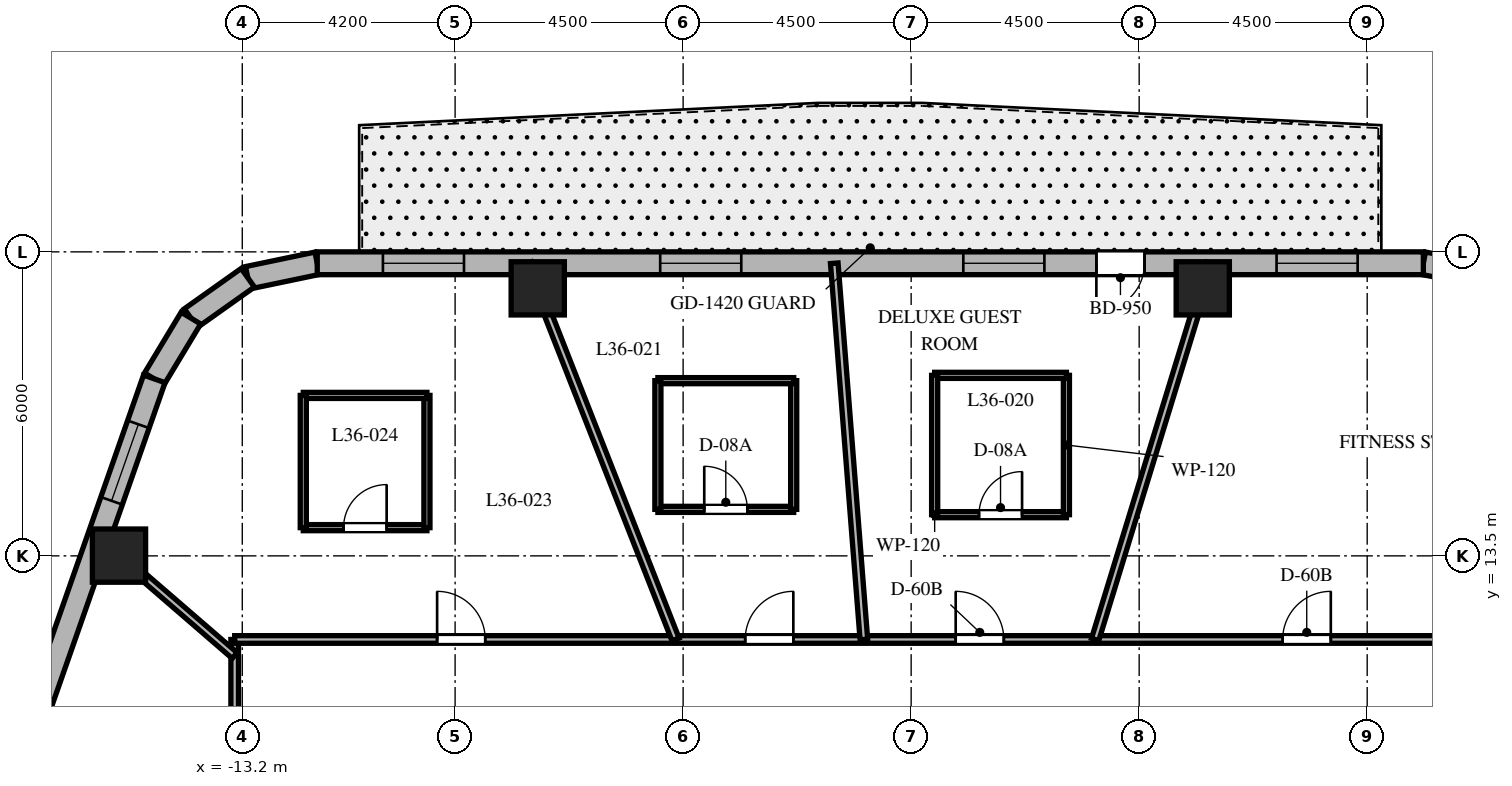
"""IFC4 building model, lengths in metres.
Left out: names, types, materials, properties, quantities, classifications, styles, units other than length and angle.
Written with IfcOpenShell. Run it as: python <this file> out.ifc"""

import sys

from ifc_helpers import new_model, si_unit, direction, frame, frame_2d, origin, origin_2d, place, context, subcontext, project, spatial, rectangle, extrude, element, fill, save


model = new_model("IFC4")
c1 = context("Model", 3, precision=1e-05, world=origin(), true_north=direction((0.0, 1.0)))
c2 = subcontext(c1, "Body", "Model", "MODEL_VIEW")
j1 = project(units=[si_unit("LENGTHUNIT", "METRE"), si_unit("PLANEANGLEUNIT", "RADIAN")], contexts=[c1])
p1 = place(None, origin())
s1 = spatial("IfcSite", under=j1, at=p1, CompositionType="ELEMENT")
p2 = place(p1, origin())
s2 = spatial("IfcBuilding", under=s1, at=p2, CompositionType="ELEMENT")
p3 = place(p2, frame((0.0, 0.0, 148.0)))
s3 = spatial("IfcBuildingStorey", under=s2, at=p3, CompositionType="ELEMENT", Elevation=148.0)
for number, where, z_axis, x_axis in (
    (1, (5.755, 18.78, 0.0), (0.0, 0.0, 1.0), (1.0, 0.0, 0.0)),
    (2, (-7.369, 18.78, 0.0), (0.0, 0.0, 1.0), (1.0, 0.0, 0.0)),
    (3, (-15.633, 13.505, 0.0), (0.0, 0.0, 1.0), (1.0, 0.0, 0.0)),
):
    element("IfcColumn", number, at=place(p3, frame(where, z_axis=z_axis, x_axis=x_axis)), inside=s3, PredefinedType="COLUMN", context=c2, shape_type="SweptSolid", body=[
        extrude(rectangle(XDim=1.05, YDim=1.05, at=origin_2d()), origin(), (0.0, 0.0, 1.0), 3.7),
    ])
p4 = place(p3, frame((11.349, 19.043, 0.0), z_axis=(0.0, 0.0, 1.0), x_axis=(-0.982931267051, 0.183973161772, 0.0)))
e4 = element("IfcWall", 4, at=p4, inside=s3, PredefinedType="SOLIDWALL", context=c2, shape_type="SweptSolid", body=[
    extrude(rectangle(XDim=1.262, YDim=0.45, at=frame_2d((0.631, 0.0))), origin(), (0.0, 0.0, 1.0), 3.4),
])
p5 = place(p3, frame((-11.72, 19.275, 0.0), z_axis=(0.0, 0.0, 1.0), x_axis=(-0.97893106758, -0.204191001093, 0.0)))
e5 = element("IfcWall", 5, at=p5, inside=s3, PredefinedType="SOLIDWALL", context=c2, shape_type="SweptSolid", body=[
    extrude(rectangle(XDim=1.4, YDim=0.45, at=frame_2d((0.7, 0.0))), origin(), (0.0, 0.0, 1.0), 3.4),
])
p6 = place(p3, frame((-13.091, 18.989, 0.0), z_axis=(0.0, 0.0, 1.0), x_axis=(-0.815574637848, -0.578651890258, 0.0)))
e6 = element("IfcWall", 6, at=p6, inside=s3, PredefinedType="SOLIDWALL", context=c2, shape_type="SweptSolid", body=[
    extrude(rectangle(XDim=1.377, YDim=0.45, at=frame_2d((0.688, 0.0))), origin(), (0.0, 0.0, 1.0), 3.4),
])
p7 = place(p3, frame((-14.214, 18.192, 0.0), z_axis=(0.0, 0.0, 1.0), x_axis=(-0.516340945502, -0.856383108193, 0.0)))
e7 = element("IfcWall", 7, at=p7, inside=s3, PredefinedType="SOLIDWALL", context=c2, shape_type="SweptSolid", body=[
    extrude(rectangle(XDim=1.4, YDim=0.45, at=frame_2d((0.7, 0.0))), origin(), (0.0, 0.0, 1.0), 3.4),
])
p8 = place(p3, frame((10.108, 19.275, 0.0), z_axis=(0.0, 0.0, 1.0), x_axis=(-1.0, 0.0, 0.0)))
e8 = element("IfcWall", 8, at=p8, inside=s3, PredefinedType="SOLIDWALL", context=c2, shape_type="SweptSolid", body=[
    extrude(rectangle(XDim=21.829, YDim=0.45, at=frame_2d((10.915, 0.0))), origin(), (0.0, 0.0, 1.0), 3.4),
])
p9 = place(p8, frame((5.503, 0.0, 0.0)))
e9 = element("IfcOpeningElement", 9, at=p9, cuts=e8, PredefinedType="OPENING", context=c2, shape_type="SweptSolid", body=[
    extrude(rectangle(XDim=0.95, YDim=2.15, at=frame_2d((0.475, 1.075))), frame((0.0, 0.235, 0.0), z_axis=(0.0, -1.0, 0.0), x_axis=(1.0, 0.0, 0.0)), (0.0, 0.0, 1.0), 0.47),
])
p10 = place(p8, frame((1.297, 0.0, 0.8)))
e10 = element("IfcOpeningElement", 10, at=p10, cuts=e8, PredefinedType="OPENING", context=c2, shape_type="SweptSolid", body=[
    extrude(rectangle(XDim=1.6, YDim=1.75, at=frame_2d((0.8, 0.875))), frame((0.0, 0.235, 0.0), z_axis=(0.0, -1.0, 0.0), x_axis=(1.0, 0.0, 0.0)), (0.0, 0.0, 1.0), 0.47),
])
p11 = place(p8, frame((7.479, 0.0, 0.8)))
e11 = element("IfcOpeningElement", 11, at=p11, cuts=e8, PredefinedType="OPENING", context=c2, shape_type="SweptSolid", body=[
    extrude(rectangle(XDim=1.6, YDim=1.75, at=frame_2d((0.8, 0.875))), frame((0.0, 0.235, 0.0), z_axis=(0.0, -1.0, 0.0), x_axis=(1.0, 0.0, 0.0)), (0.0, 0.0, 1.0), 0.47),
])
p12 = place(p8, frame((13.461, 0.0, 0.8)))
e12 = element("IfcOpeningElement", 12, at=p12, cuts=e8, PredefinedType="OPENING", context=c2, shape_type="SweptSolid", body=[
    extrude(rectangle(XDim=1.6, YDim=1.75, at=frame_2d((0.8, 0.875))), frame((0.0, 0.235, 0.0), z_axis=(0.0, -1.0, 0.0), x_axis=(1.0, 0.0, 0.0)), (0.0, 0.0, 1.0), 0.47),
])
p13 = place(p8, frame((18.933, 0.0, 0.8)))
e13 = element("IfcOpeningElement", 13, at=p13, cuts=e8, PredefinedType="OPENING", context=c2, shape_type="SweptSolid", body=[
    extrude(rectangle(XDim=1.6, YDim=1.75, at=frame_2d((0.8, 0.875))), frame((0.0, 0.235, 0.0), z_axis=(0.0, -1.0, 0.0), x_axis=(1.0, 0.0, 0.0)), (0.0, 0.0, 1.0), 0.47),
])
p14 = place(p3, frame((-14.937, 16.993, 0.0), z_axis=(0.0, 0.0, 1.0), x_axis=(-0.330431575061, -0.943829949834, 0.0)))
e14 = element("IfcWall", 14, at=p14, inside=s3, PredefinedType="SOLIDWALL", context=c2, shape_type="SweptSolid", body=[
    extrude(rectangle(XDim=17.689, YDim=0.45, at=frame_2d((8.844, 0.0))), origin(), (0.0, 0.0, 1.0), 3.4),
])
p15 = place(p14, frame((0.95, 0.0, 0.8)))
e15 = element("IfcOpeningElement", 15, at=p15, cuts=e14, PredefinedType="OPENING", context=c2, shape_type="SweptSolid", body=[
    extrude(rectangle(XDim=1.6, YDim=1.75, at=frame_2d((0.8, 0.875))), frame((0.0, 0.235, 0.0), z_axis=(0.0, -1.0, 0.0), x_axis=(1.0, 0.0, 0.0)), (0.0, 0.0, 1.0), 0.47),
])
p16 = place(p14, frame((7.99, 0.0, 0.8)))
e16 = element("IfcOpeningElement", 16, at=p16, cuts=e14, PredefinedType="OPENING", context=c2, shape_type="SweptSolid", body=[
    extrude(rectangle(XDim=1.6, YDim=1.75, at=frame_2d((0.8, 0.875))), frame((0.0, 0.235, 0.0), z_axis=(0.0, -1.0, 0.0), x_axis=(1.0, 0.0, 0.0)), (0.0, 0.0, 1.0), 0.47),
])
p17 = place(p14, frame((15.084, 0.0, 0.8)))
e17 = element("IfcOpeningElement", 17, at=p17, cuts=e14, PredefinedType="OPENING", context=c2, shape_type="SweptSolid", body=[
    extrude(rectangle(XDim=1.6, YDim=1.75, at=frame_2d((0.8, 0.875))), frame((0.0, 0.235, 0.0), z_axis=(0.0, -1.0, 0.0), x_axis=(1.0, 0.0, 0.0)), (0.0, 0.0, 1.0), 0.47),
])
p18 = place(p3, frame((-13.35, -11.85, 0.0), z_axis=(0.0, 0.0, 1.0), x_axis=(0.0, 1.0, 0.0)))
e18 = element("IfcWall", 18, at=p18, inside=s3, PredefinedType="PARTITIONING", context=c2, shape_type="SweptSolid", body=[
    extrude(rectangle(XDim=23.7, YDim=0.15, at=frame_2d((11.85, 0.0))), origin(), (0.0, 0.0, 1.0), 2.84),
])
p19 = place(p18, frame((18.389, 0.0, 0.0)))
e19 = element("IfcOpeningElement", 19, at=p19, cuts=e18, PredefinedType="OPENING", context=c2, shape_type="SweptSolid", body=[
    extrude(rectangle(XDim=0.95, YDim=2.03, at=frame_2d((0.475, 1.015))), frame((0.0, 0.085, 0.0), z_axis=(0.0, -1.0, 0.0), x_axis=(1.0, 0.0, 0.0)), (0.0, 0.0, 1.0), 0.17),
])
p20 = place(p18, frame((10.751, 0.0, 0.0)))
e20 = element("IfcOpeningElement", 20, at=p20, cuts=e18, PredefinedType="OPENING", context=c2, shape_type="SweptSolid", body=[
    extrude(rectangle(XDim=0.95, YDim=2.03, at=frame_2d((0.475, 1.015))), frame((0.0, 0.085, 0.0), z_axis=(0.0, -1.0, 0.0), x_axis=(1.0, 0.0, 0.0)), (0.0, 0.0, 1.0), 0.17),
])
p21 = place(p18, frame((5.951, 0.0, 0.0)))
e21 = element("IfcOpeningElement", 21, at=p21, cuts=e18, PredefinedType="OPENING", context=c2, shape_type="SweptSolid", body=[
    extrude(rectangle(XDim=0.9, YDim=2.03, at=frame_2d((0.45, 1.015))), frame((0.0, 0.085, 0.0), z_axis=(0.0, -1.0, 0.0), x_axis=(1.0, 0.0, 0.0)), (0.0, 0.0, 1.0), 0.17),
])
p22 = place(p18, frame((1.993, 0.0, 0.0)))
e22 = element("IfcOpeningElement", 22, at=p22, cuts=e18, PredefinedType="OPENING", context=c2, shape_type="SweptSolid", body=[
    extrude(rectangle(XDim=0.9, YDim=2.03, at=frame_2d((0.45, 1.015))), frame((0.0, 0.085, 0.0), z_axis=(0.0, -1.0, 0.0), x_axis=(1.0, 0.0, 0.0)), (0.0, 0.0, 1.0), 0.17),
])
p23 = place(p3, frame((-13.35, 11.85, 0.0), z_axis=(0.0, 0.0, 1.0), x_axis=(1.0, 0.0, 0.0)))
e23 = element("IfcWall", 23, at=p23, inside=s3, PredefinedType="PARTITIONING", context=c2, shape_type="SweptSolid", body=[
    extrude(rectangle(XDim=26.7, YDim=0.15, at=frame_2d((13.35, 0.0))), origin(), (0.0, 0.0, 1.0), 2.84),
])
p24 = place(p23, frame((20.682, 0.0, 0.0)))
e24 = element("IfcOpeningElement", 24, at=p24, cuts=e23, PredefinedType="OPENING", context=c2, shape_type="SweptSolid", body=[
    extrude(rectangle(XDim=0.95, YDim=2.03, at=frame_2d((0.475, 1.015))), frame((0.0, 0.085, 0.0), z_axis=(0.0, -1.0, 0.0), x_axis=(1.0, 0.0, 0.0)), (0.0, 0.0, 1.0), 0.17),
])
p25 = place(p23, frame((14.229, 0.0, 0.0)))
e25 = element("IfcOpeningElement", 25, at=p25, cuts=e23, PredefinedType="OPENING", context=c2, shape_type="SweptSolid", body=[
    extrude(rectangle(XDim=0.95, YDim=2.03, at=frame_2d((0.475, 1.015))), frame((0.0, 0.085, 0.0), z_axis=(0.0, -1.0, 0.0), x_axis=(1.0, 0.0, 0.0)), (0.0, 0.0, 1.0), 0.17),
])
p26 = place(p23, frame((10.075, 0.0, 0.0)))
e26 = element("IfcOpeningElement", 26, at=p26, cuts=e23, PredefinedType="OPENING", context=c2, shape_type="SweptSolid", body=[
    extrude(rectangle(XDim=0.95, YDim=2.03, at=frame_2d((0.475, 1.015))), frame((0.0, 0.085, 0.0), z_axis=(0.0, -1.0, 0.0), x_axis=(1.0, 0.0, 0.0)), (0.0, 0.0, 1.0), 0.17),
])
p27 = place(p23, frame((3.995, 0.0, 0.0)))
e27 = element("IfcOpeningElement", 27, at=p27, cuts=e23, PredefinedType="OPENING", context=c2, shape_type="SweptSolid", body=[
    extrude(rectangle(XDim=0.95, YDim=2.03, at=frame_2d((0.475, 1.015))), frame((0.0, 0.085, 0.0), z_axis=(0.0, -1.0, 0.0), x_axis=(1.0, 0.0, 0.0)), (0.0, 0.0, 1.0), 0.17),
])
p28 = place(p3, frame((3.631, 11.85, 0.0), z_axis=(0.0, 0.0, 1.0), x_axis=(0.293007573338, 0.956110120209, 0.0)))
e28 = element("IfcWall", 28, at=p28, inside=s3, PredefinedType="PARTITIONING", context=c2, shape_type="SweptSolid", body=[
    extrude(rectangle(XDim=7.766, YDim=0.15, at=frame_2d((3.883, 0.0))), origin(), (0.0, 0.0, 1.0), 2.64),
])
p29 = place(p3, frame((-0.933, 11.85, 0.0), z_axis=(0.0, 0.0, 1.0), x_axis=(-0.078476156849, 0.996915990847, 0.0)))
e29 = element("IfcWall", 29, at=p29, inside=s3, PredefinedType="PARTITIONING", context=c2, shape_type="SweptSolid", body=[
    extrude(rectangle(XDim=7.448, YDim=0.15, at=frame_2d((3.724, 0.0))), origin(), (0.0, 0.0, 1.0), 2.64),
])
p30 = place(p3, frame((-4.65, 11.85, 0.0), z_axis=(0.0, 0.0, 1.0), x_axis=(-0.365265947993, 0.930903210456, 0.0)))
e30 = element("IfcWall", 30, at=p30, inside=s3, PredefinedType="PARTITIONING", context=c2, shape_type="SweptSolid", body=[
    extrude(rectangle(XDim=7.976, YDim=0.15, at=frame_2d((3.988, 0.0))), origin(), (0.0, 0.0, 1.0), 2.64),
])
p31 = place(p3, frame((-13.35, 11.533, 0.0), z_axis=(0.0, 0.0, 1.0), x_axis=(-0.756711647314, 0.65374879183, 0.0)))
e31 = element("IfcWall", 31, at=p31, inside=s3, PredefinedType="PARTITIONING", context=c2, shape_type="SweptSolid", body=[
    extrude(rectangle(XDim=3.55, YDim=0.15, at=frame_2d((1.775, 0.0))), origin(), (0.0, 0.0, 1.0), 2.64),
])
p32 = place(p3, frame((0.464, 14.313, 0.0), z_axis=(0.0, 0.0, 1.0), x_axis=(1.0, 0.0, 0.0)))
e32 = element("IfcWall", 32, at=p32, inside=s3, PredefinedType="PARTITIONING", context=c2, shape_type="SweptSolid", body=[
    extrude(rectangle(XDim=2.6, YDim=0.12, at=frame_2d((1.3, 0.0))), origin(), (0.0, 0.0, 1.0), 3.4),
])
p33 = place(p32, frame((0.875, 0.0, 0.0)))
e33 = element("IfcOpeningElement", 33, at=p33, cuts=e32, PredefinedType="OPENING", context=c2, shape_type="SweptSolid", body=[
    extrude(rectangle(XDim=0.85, YDim=2.03, at=frame_2d((0.425, 1.015))), frame((0.0, 0.07, 0.0), z_axis=(0.0, -1.0, 0.0), x_axis=(1.0, 0.0, 0.0)), (0.0, 0.0, 1.0), 0.14),
])
p34 = place(p3, frame((3.064, 14.313, 0.0), z_axis=(0.0, 0.0, 1.0), x_axis=(0.0, 1.0, 0.0)))
e34 = element("IfcWall", 34, at=p34, inside=s3, PredefinedType="PARTITIONING", context=c2, shape_type="SweptSolid", body=[
    extrude(rectangle(XDim=2.75, YDim=0.12, at=frame_2d((1.375, 0.0))), origin(), (0.0, 0.0, 1.0), 2.841),
])
p35 = place(p3, frame((3.064, 17.063, 0.0), z_axis=(0.0, 0.0, 1.0), x_axis=(-1.0, 0.0, 0.0)))
e35 = element("IfcWall", 35, at=p35, inside=s3, PredefinedType="PARTITIONING", context=c2, shape_type="SweptSolid", body=[
    extrude(rectangle(XDim=2.6, YDim=0.12, at=frame_2d((1.3, 0.0))), origin(), (0.0, 0.0, 1.0), 3.4),
])
p36 = place(p3, frame((0.464, 17.063, 0.0), z_axis=(0.0, 0.0, 1.0), x_axis=(0.0, -1.0, 0.0)))
e36 = element("IfcWall", 36, at=p36, inside=s3, PredefinedType="PARTITIONING", context=c2, shape_type="SweptSolid", body=[
    extrude(rectangle(XDim=2.75, YDim=0.12, at=frame_2d((1.375, 0.0))), origin(), (0.0, 0.0, 1.0), 2.841),
])
p37 = place(p3, frame((-4.998, 14.418, 0.0), z_axis=(0.0, 0.0, 1.0), x_axis=(1.0, 0.0, 0.0)))
e37 = element("IfcWall", 37, at=p37, inside=s3, PredefinedType="PARTITIONING", context=c2, shape_type="SweptSolid", body=[
    extrude(rectangle(XDim=2.68, YDim=0.12, at=frame_2d((1.34, 0.0))), origin(), (0.0, 0.0, 1.0), 3.4),
])
p38 = place(p37, frame((0.915, 0.0, 0.0)))
e38 = element("IfcOpeningElement", 38, at=p38, cuts=e37, PredefinedType="OPENING", context=c2, shape_type="SweptSolid", body=[
    extrude(rectangle(XDim=0.85, YDim=2.03, at=frame_2d((0.425, 1.015))), frame((0.0, 0.07, 0.0), z_axis=(0.0, -1.0, 0.0), x_axis=(1.0, 0.0, 0.0)), (0.0, 0.0, 1.0), 0.14),
])
p39 = place(p3, frame((-2.318, 14.418, 0.0), z_axis=(0.0, 0.0, 1.0), x_axis=(0.0, 1.0, 0.0)))
e39 = element("IfcWall", 39, at=p39, inside=s3, PredefinedType="PARTITIONING", context=c2, shape_type="SweptSolid", body=[
    extrude(rectangle(XDim=2.54, YDim=0.12, at=frame_2d((1.27, 0.0))), origin(), (0.0, 0.0, 1.0), 2.841),
])
p40 = place(p3, frame((-2.318, 16.958, 0.0), z_axis=(0.0, 0.0, 1.0), x_axis=(-1.0, 0.0, 0.0)))
e40 = element("IfcWall", 40, at=p40, inside=s3, PredefinedType="PARTITIONING", context=c2, shape_type="SweptSolid", body=[
    extrude(rectangle(XDim=2.68, YDim=0.12, at=frame_2d((1.34, 0.0))), origin(), (0.0, 0.0, 1.0), 3.4),
])
p41 = place(p3, frame((-4.998, 16.958, 0.0), z_axis=(0.0, 0.0, 1.0), x_axis=(0.0, -1.0, 0.0)))
e41 = element("IfcWall", 41, at=p41, inside=s3, PredefinedType="PARTITIONING", context=c2, shape_type="SweptSolid", body=[
    extrude(rectangle(XDim=2.54, YDim=0.12, at=frame_2d((1.27, 0.0))), origin(), (0.0, 0.0, 1.0), 2.841),
])
p42 = place(p3, frame((-11.996, 14.057, 0.0), z_axis=(0.0, 0.0, 1.0), x_axis=(1.0, 0.0, 0.0)))
e42 = element("IfcWall", 42, at=p42, inside=s3, PredefinedType="PARTITIONING", context=c2, shape_type="SweptSolid", body=[
    extrude(rectangle(XDim=2.44, YDim=0.12, at=frame_2d((1.22, 0.0))), origin(), (0.0, 0.0, 1.0), 2.927),
])
p43 = place(p42, frame((0.795, 0.0, 0.0)))
e43 = element("IfcOpeningElement", 43, at=p43, cuts=e42, PredefinedType="OPENING", context=c2, shape_type="SweptSolid", body=[
    extrude(rectangle(XDim=0.85, YDim=2.03, at=frame_2d((0.425, 1.015))), frame((0.0, 0.07, 0.0), z_axis=(0.0, -1.0, 0.0), x_axis=(1.0, 0.0, 0.0)), (0.0, 0.0, 1.0), 0.14),
])
p44 = place(p3, frame((-9.556, 14.057, 0.0), z_axis=(0.0, 0.0, 1.0), x_axis=(0.0, 1.0, 0.0)))
e44 = element("IfcWall", 44, at=p44, inside=s3, PredefinedType="PARTITIONING", context=c2, shape_type="SweptSolid", body=[
    extrude(rectangle(XDim=2.61, YDim=0.12, at=frame_2d((1.305, 0.0))), origin(), (0.0, 0.0, 1.0), 2.927),
])
p45 = place(p3, frame((-9.556, 16.667, 0.0), z_axis=(0.0, 0.0, 1.0), x_axis=(-1.0, 0.0, 0.0)))
e45 = element("IfcWall", 45, at=p45, inside=s3, PredefinedType="PARTITIONING", context=c2, shape_type="SweptSolid", body=[
    extrude(rectangle(XDim=2.44, YDim=0.12, at=frame_2d((1.22, 0.0))), origin(), (0.0, 0.0, 1.0), 2.64),
])
p46 = place(p3, frame((-11.996, 16.667, 0.0), z_axis=(0.0, 0.0, 1.0), x_axis=(0.0, -1.0, 0.0)))
e46 = element("IfcWall", 46, at=p46, inside=s3, PredefinedType="PARTITIONING", context=c2, shape_type="SweptSolid", body=[
    extrude(rectangle(XDim=2.61, YDim=0.12, at=frame_2d((1.305, 0.0))), origin(), (0.0, 0.0, 1.0), 2.64),
])
p47 = place(p9, origin())
e47 = element("IfcDoor", 47, at=p47, inside=s3, OperationType="SINGLE_SWING_RIGHT", PredefinedType="DOOR", context=c2, shape_type="SweptSolid", body=[
    extrude(rectangle(XDim=0.95, YDim=2.15, at=frame_2d((0.475, 1.075))), frame((0.0, 0.025, 0.0), z_axis=(0.0, -1.0, 0.0), x_axis=(1.0, 0.0, 0.0)), (0.0, 0.0, 1.0), 0.05),
])
fill(e9, e47)
p48 = place(p10, origin())
e48 = element("IfcWindow", 48, at=p48, inside=s3, PartitioningType="SINGLE_PANEL", PredefinedType="WINDOW", context=c2, shape_type="SweptSolid", body=[
    extrude(rectangle(XDim=1.6, YDim=1.75, at=frame_2d((0.8, 0.875))), frame((0.0, 0.03, 0.0), z_axis=(0.0, -1.0, 0.0), x_axis=(1.0, 0.0, 0.0)), (0.0, 0.0, 1.0), 0.06),
])
fill(e10, e48)
p49 = place(p11, origin())
e49 = element("IfcWindow", 49, at=p49, inside=s3, PartitioningType="SINGLE_PANEL", PredefinedType="WINDOW", context=c2, shape_type="SweptSolid", body=[
    extrude(rectangle(XDim=1.6, YDim=1.75, at=frame_2d((0.8, 0.875))), frame((0.0, 0.03, 0.0), z_axis=(0.0, -1.0, 0.0), x_axis=(1.0, 0.0, 0.0)), (0.0, 0.0, 1.0), 0.06),
])
fill(e11, e49)
p50 = place(p12, origin())
e50 = element("IfcWindow", 50, at=p50, inside=s3, PartitioningType="SINGLE_PANEL", PredefinedType="WINDOW", context=c2, shape_type="SweptSolid", body=[
    extrude(rectangle(XDim=1.6, YDim=1.75, at=frame_2d((0.8, 0.875))), frame((0.0, 0.03, 0.0), z_axis=(0.0, -1.0, 0.0), x_axis=(1.0, 0.0, 0.0)), (0.0, 0.0, 1.0), 0.06),
])
fill(e12, e50)
p51 = place(p13, origin())
e51 = element("IfcWindow", 51, at=p51, inside=s3, PartitioningType="SINGLE_PANEL", PredefinedType="WINDOW", context=c2, shape_type="SweptSolid", body=[
    extrude(rectangle(XDim=1.6, YDim=1.75, at=frame_2d((0.8, 0.875))), frame((0.0, 0.03, 0.0), z_axis=(0.0, -1.0, 0.0), x_axis=(1.0, 0.0, 0.0)), (0.0, 0.0, 1.0), 0.06),
])
fill(e13, e51)
p52 = place(p15, origin())
e52 = element("IfcWindow", 52, at=p52, inside=s3, PartitioningType="SINGLE_PANEL", PredefinedType="WINDOW", context=c2, shape_type="SweptSolid", body=[
    extrude(rectangle(XDim=1.6, YDim=1.75, at=frame_2d((0.8, 0.875))), frame((0.0, 0.03, 0.0), z_axis=(0.0, -1.0, 0.0), x_axis=(1.0, 0.0, 0.0)), (0.0, 0.0, 1.0), 0.06),
])
fill(e15, e52)
p53 = place(p24, origin())
e53 = element("IfcDoor", 53, at=p53, inside=s3, OperationType="SINGLE_SWING_RIGHT", PredefinedType="DOOR", context=c2, shape_type="SweptSolid", body=[
    extrude(rectangle(XDim=0.95, YDim=2.03, at=frame_2d((0.475, 1.015))), frame((0.0, 0.025, 0.0), z_axis=(0.0, -1.0, 0.0), x_axis=(1.0, 0.0, 0.0)), (0.0, 0.0, 1.0), 0.05),
])
fill(e24, e53)
p54 = place(p25, origin())
e54 = element("IfcDoor", 54, at=p54, inside=s3, OperationType="SINGLE_SWING_LEFT", PredefinedType="DOOR", context=c2, shape_type="SweptSolid", body=[
    extrude(rectangle(XDim=0.95, YDim=2.03, at=frame_2d((0.475, 1.015))), frame((0.0, 0.025, 0.0), z_axis=(0.0, -1.0, 0.0), x_axis=(1.0, 0.0, 0.0)), (0.0, 0.0, 1.0), 0.05),
])
fill(e25, e54)
p55 = place(p33, origin())
e55 = element("IfcDoor", 55, at=p55, inside=s3, OperationType="SINGLE_SWING_RIGHT", PredefinedType="DOOR", context=c2, shape_type="SweptSolid", body=[
    extrude(rectangle(XDim=0.85, YDim=2.03, at=frame_2d((0.425, 1.015))), frame((0.0, 0.025, 0.0), z_axis=(0.0, -1.0, 0.0), x_axis=(1.0, 0.0, 0.0)), (0.0, 0.0, 1.0), 0.05),
])
fill(e33, e55)
p56 = place(p26, origin())
e56 = element("IfcDoor", 56, at=p56, inside=s3, OperationType="SINGLE_SWING_RIGHT", PredefinedType="DOOR", context=c2, shape_type="SweptSolid", body=[
    extrude(rectangle(XDim=0.95, YDim=2.03, at=frame_2d((0.475, 1.015))), frame((0.0, 0.025, 0.0), z_axis=(0.0, -1.0, 0.0), x_axis=(1.0, 0.0, 0.0)), (0.0, 0.0, 1.0), 0.05),
])
fill(e26, e56)
p57 = place(p38, origin())
e57 = element("IfcDoor", 57, at=p57, inside=s3, OperationType="SINGLE_SWING_LEFT", PredefinedType="DOOR", context=c2, shape_type="SweptSolid", body=[
    extrude(rectangle(XDim=0.85, YDim=2.03, at=frame_2d((0.425, 1.015))), frame((0.0, 0.025, 0.0), z_axis=(0.0, -1.0, 0.0), x_axis=(1.0, 0.0, 0.0)), (0.0, 0.0, 1.0), 0.05),
])
fill(e38, e57)
p58 = place(p27, origin())
e58 = element("IfcDoor", 58, at=p58, inside=s3, OperationType="SINGLE_SWING_LEFT", PredefinedType="DOOR", context=c2, shape_type="SweptSolid", body=[
    extrude(rectangle(XDim=0.95, YDim=2.03, at=frame_2d((0.475, 1.015))), frame((0.0, 0.025, 0.0), z_axis=(0.0, -1.0, 0.0), x_axis=(1.0, 0.0, 0.0)), (0.0, 0.0, 1.0), 0.05),
])
fill(e27, e58)
p59 = place(p43, origin())
e59 = element("IfcDoor", 59, at=p59, inside=s3, OperationType="SINGLE_SWING_RIGHT", PredefinedType="DOOR", context=c2, shape_type="SweptSolid", body=[
    extrude(rectangle(XDim=0.85, YDim=2.03, at=frame_2d((0.425, 1.015))), frame((0.0, 0.025, 0.0), z_axis=(0.0, -1.0, 0.0), x_axis=(1.0, 0.0, 0.0)), (0.0, 0.0, 1.0), 0.05),
])
fill(e43, e59)
save(model, sys.argv[1])
